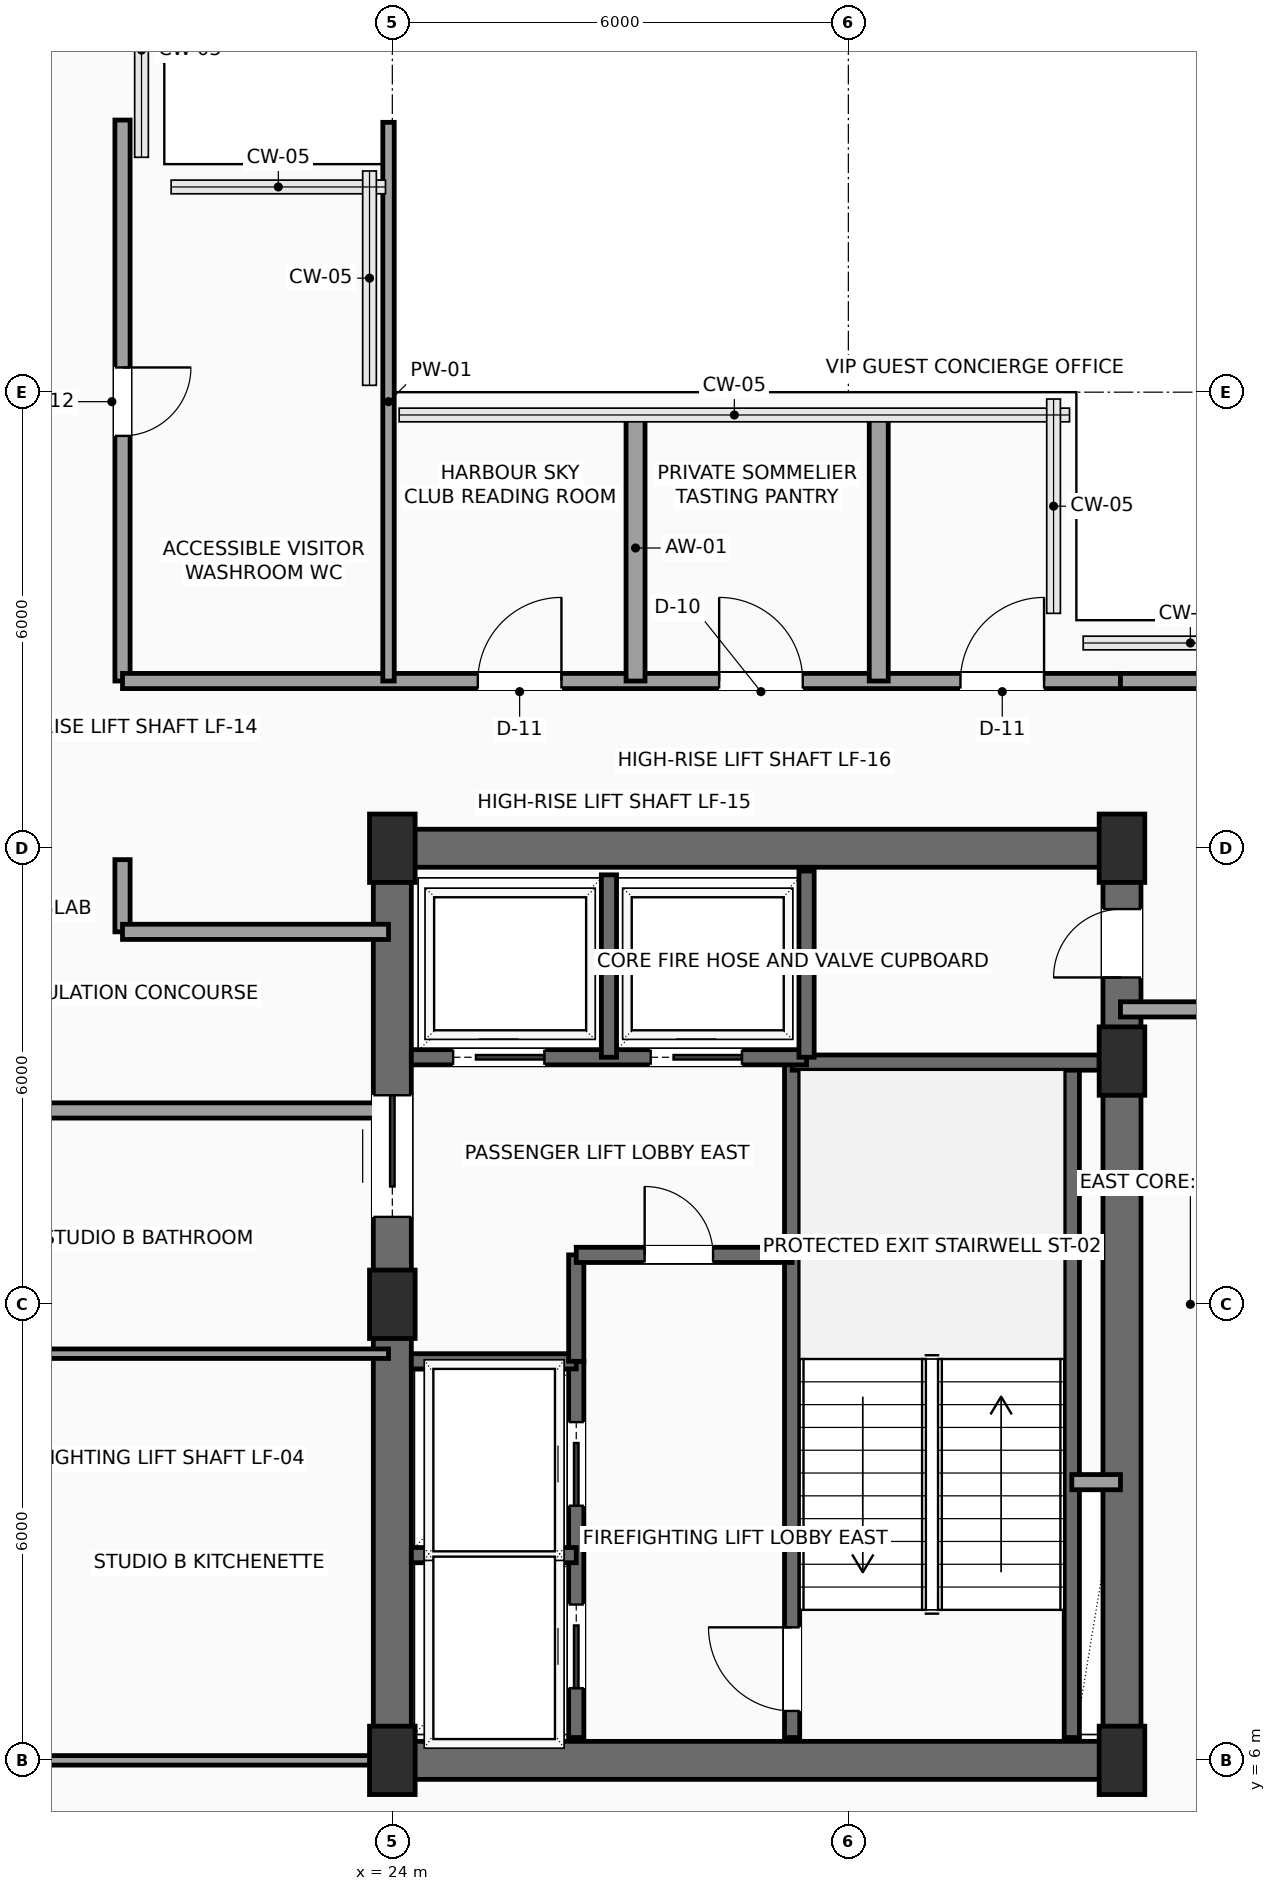
"""IFC4 building model, lengths in metres.
Left out: names, types, materials, properties, quantities, classifications, styles, units other than length and angle.
Written with IfcOpenShell. Run it as: python <this file> out.ifc"""

import sys

from ifc_helpers import new_model, si_unit, direction, frame, frame_2d, origin, origin_2d, place, context, subcontext, project, spatial, rectangle, extrude, element, fill, save


model = new_model("IFC4")
c1 = context("Model", 3, precision=1e-05, world=origin(), true_north=direction((0.0, 1.0)))
c2 = subcontext(c1, "Body", "Model", "MODEL_VIEW")
j1 = project(units=[si_unit("LENGTHUNIT", "METRE"), si_unit("PLANEANGLEUNIT", "RADIAN")], contexts=[c1])
p1 = place(None, origin())
s1 = spatial("IfcSite", under=j1, at=p1, CompositionType="ELEMENT")
p2 = place(p1, origin())
s2 = spatial("IfcBuilding", under=s1, at=p2, CompositionType="ELEMENT")
p3 = place(p2, frame((0.0, 0.0, 243.2)))
s3 = spatial("IfcBuildingStorey", under=s2, at=p3, CompositionType="ELEMENT", Elevation=243.2)
for number, where, z_axis, x_axis in (
    (1, (24.0, 6.0, 0.0), (0.0, 0.0, 1.0), (1.0, 0.0, 0.0)),
    (2, (24.0, 12.0, 0.0), (0.0, 0.0, 1.0), (1.0, 0.0, 0.0)),
    (3, (24.0, 18.0, 0.0), (0.0, 0.0, 1.0), (1.0, 0.0, 0.0)),
    (4, (33.6, 6.0, 0.0), (0.0, 0.0, 1.0), (1.0, 0.0, 0.0)),
    (5, (33.6, 15.2, 0.0), (0.0, 0.0, 1.0), (1.0, 0.0, 0.0)),
    (6, (33.6, 18.0, 0.0), (0.0, 0.0, 1.0), (1.0, 0.0, 0.0)),
):
    element("IfcColumn", number, at=place(p3, frame(where, z_axis=z_axis, x_axis=x_axis)), inside=s3, PredefinedType="COLUMN", context=c2, shape_type="SweptSolid", body=[
        extrude(rectangle(XDim=0.6, YDim=0.9, at=origin_2d()), origin(), (0.0, 0.0, 1.0), 3.5),
    ])
for number, where, z_axis, x_axis in (
    (7, (24.0, 6.0, 0.0), (0.0, 0.0, 1.0), (1.0, 0.0, 0.0)),
    (8, (24.0, 18.0, 0.0), (0.0, 0.0, 1.0), (1.0, 0.0, 0.0)),
):
    element("IfcWall", number, at=place(p3, frame(where, z_axis=z_axis, x_axis=x_axis)), inside=s3, PredefinedType="SHEAR", context=c2, shape_type="SweptSolid", body=[
        extrude(rectangle(XDim=9.6, YDim=0.5, at=frame_2d((4.8, 0.0))), origin(), (0.0, 0.0, 1.0), 3.3),
    ])
p4 = place(p3, frame((24.0, 6.0, 0.0), z_axis=(0.0, 0.0, 1.0), x_axis=(0.0, 1.0, 0.0)))
e9 = element("IfcWall", 9, at=p4, inside=s3, PredefinedType="SHEAR", context=c2, shape_type="SweptSolid", body=[
    extrude(rectangle(XDim=12.0, YDim=0.5, at=frame_2d((6.0, 0.0))), origin(), (0.0, 0.0, 1.0), 3.3),
])
p5 = place(p4, frame((7.15, 0.0, 0.0)))
e10 = element("IfcOpeningElement", 10, at=p5, cuts=e9, PredefinedType="OPENING", context=c2, shape_type="SweptSolid", body=[
    extrude(rectangle(XDim=1.6, YDim=2.3, at=frame_2d((0.8, 1.15))), frame((0.0, 0.26, 0.0), z_axis=(0.0, -1.0, 0.0), x_axis=(1.0, 0.0, 0.0)), (0.0, 0.0, 1.0), 0.52),
])
p6 = place(p3, frame((33.6, 6.0, 0.0), z_axis=(0.0, 0.0, 1.0), x_axis=(0.0, 1.0, 0.0)))
e11 = element("IfcWall", 11, at=p6, inside=s3, PredefinedType="SHEAR", context=c2, shape_type="SweptSolid", body=[
    extrude(rectangle(XDim=12.0, YDim=0.5, at=frame_2d((6.0, 0.0))), origin(), (0.0, 0.0, 1.0), 3.3),
])
p7 = place(p6, frame((10.3, 0.0, 0.0)))
e12 = element("IfcOpeningElement", 12, at=p7, cuts=e11, PredefinedType="OPENING", context=c2, shape_type="SweptSolid", body=[
    extrude(rectangle(XDim=0.9, YDim=2.15, at=frame_2d((0.45, 1.075))), frame((0.0, 0.26, 0.0), z_axis=(0.0, -1.0, 0.0), x_axis=(1.0, 0.0, 0.0)), (0.0, 0.0, 1.0), 0.52),
])
p8 = place(p3, frame((29.26, 6.3, 0.0), z_axis=(0.0, 0.0, 1.0), x_axis=(0.0, 1.0, 0.0)))
e13 = element("IfcWall", 13, at=p8, inside=s3, PredefinedType="SHEAR", context=c2, shape_type="SweptSolid", body=[
    extrude(rectangle(XDim=8.88, YDim=0.2, at=frame_2d((4.44, 0.0))), origin(), (0.0, 0.0, 1.0), 3.3),
])
p9 = place(p8, frame((0.35, 0.0, 0.0)))
e14 = element("IfcOpeningElement", 14, at=p9, cuts=e13, PredefinedType="OPENING", context=c2, shape_type="SweptSolid", body=[
    extrude(rectangle(XDim=1.1, YDim=2.2, at=frame_2d((0.55, 1.1))), frame((0.0, 0.11, 0.0), z_axis=(0.0, -1.0, 0.0), x_axis=(1.0, 0.0, 0.0)), (0.0, 0.0, 1.0), 0.22),
])
p10 = place(p3, frame((32.94, 6.3, 0.0), z_axis=(0.0, 0.0, 1.0), x_axis=(0.0, 1.0, 0.0)))
e15 = element("IfcWall", 15, at=p10, inside=s3, PredefinedType="SHEAR", context=c2, shape_type="SweptSolid", body=[
    extrude(rectangle(XDim=8.88, YDim=0.2, at=frame_2d((4.44, 0.0))), origin(), (0.0, 0.0, 1.0), 3.3),
])
p11 = place(p3, frame((29.26, 15.18, 0.0), z_axis=(0.0, 0.0, 1.0), x_axis=(1.0, 0.0, 0.0)))
e16 = element("IfcWall", 16, at=p11, inside=s3, PredefinedType="SHEAR", context=c2, shape_type="SweptSolid", body=[
    extrude(rectangle(XDim=4.04, YDim=0.2, at=frame_2d((2.02, 0.0))), origin(), (0.0, 0.0, 1.0), 3.3),
])
p12 = place(p3, frame((26.42, 6.3, 0.0), z_axis=(0.0, 0.0, 1.0), x_axis=(0.0, 1.0, 0.0)))
e17 = element("IfcWall", 17, at=p12, inside=s3, PredefinedType="SHEAR", context=c2, shape_type="SweptSolid", body=[
    extrude(rectangle(XDim=4.95, YDim=0.2, at=frame_2d((2.475, 0.0))), origin(), (0.0, 0.0, 1.0), 3.3),
])
p13 = place(p12, frame((0.65, 0.0, 0.0)))
e18 = element("IfcOpeningElement", 18, at=p13, cuts=e17, PredefinedType="OPENING", context=c2, shape_type="SweptSolid", body=[
    extrude(rectangle(XDim=1.1, YDim=2.2, at=frame_2d((0.55, 1.1))), frame((0.0, 0.11, 0.0), z_axis=(0.0, -1.0, 0.0), x_axis=(1.0, 0.0, 0.0)), (0.0, 0.0, 1.0), 0.22),
])
p14 = place(p12, frame((3.05, 0.0, 0.0)))
e19 = element("IfcOpeningElement", 19, at=p14, cuts=e17, PredefinedType="OPENING", context=c2, shape_type="SweptSolid", body=[
    extrude(rectangle(XDim=1.1, YDim=2.2, at=frame_2d((0.55, 1.1))), frame((0.0, 0.11, 0.0), z_axis=(0.0, -1.0, 0.0), x_axis=(1.0, 0.0, 0.0)), (0.0, 0.0, 1.0), 0.22),
])
for number, where, z_axis, x_axis in (
    (20, (24.25, 8.7, 0.0), (0.0, 0.0, 1.0), (1.0, 0.0, 0.0)),
    (21, (24.25, 11.25, 0.0), (0.0, 0.0, 1.0), (1.0, 0.0, 0.0)),
):
    element("IfcWall", number, at=place(p3, frame(where, z_axis=z_axis, x_axis=x_axis)), inside=s3, PredefinedType="SHEAR", context=c2, shape_type="SweptSolid", body=[
        extrude(rectangle(XDim=2.17, YDim=0.2, at=frame_2d((1.085, 0.0))), origin(), (0.0, 0.0, 1.0), 3.3),
    ])
p15 = place(p3, frame((26.42, 11.25, 0.0), z_axis=(0.0, 0.0, 1.0), x_axis=(0.0, 1.0, 0.0)))
e22 = element("IfcWall", 22, at=p15, inside=s3, PredefinedType="SHEAR", context=c2, shape_type="SweptSolid", body=[
    extrude(rectangle(XDim=1.4, YDim=0.2, at=frame_2d((0.7, 0.0))), origin(), (0.0, 0.0, 1.0), 3.3),
])
p16 = place(p3, frame((26.42, 12.65, 0.0), z_axis=(0.0, 0.0, 1.0), x_axis=(1.0, 0.0, 0.0)))
e23 = element("IfcWall", 23, at=p16, inside=s3, PredefinedType="SHEAR", context=c2, shape_type="SweptSolid", body=[
    extrude(rectangle(XDim=2.84, YDim=0.2, at=frame_2d((1.42, 0.0))), origin(), (0.0, 0.0, 1.0), 3.3),
])
p17 = place(p16, frame((0.9, 0.0, 0.0)))
e24 = element("IfcOpeningElement", 24, at=p17, cuts=e23, PredefinedType="OPENING", context=c2, shape_type="SweptSolid", body=[
    extrude(rectangle(XDim=0.9, YDim=2.15, at=frame_2d((0.45, 1.075))), frame((0.0, 0.11, 0.0), z_axis=(0.0, -1.0, 0.0), x_axis=(1.0, 0.0, 0.0)), (0.0, 0.0, 1.0), 0.22),
])
p18 = place(p3, frame((32.94, 9.66, 0.0), z_axis=(0.0, 0.0, 1.0), x_axis=(1.0, 0.0, 0.0)))
e25 = element("IfcWall", 25, at=p18, inside=s3, PredefinedType="SOLIDWALL", context=c2, shape_type="SweptSolid", body=[
    extrude(rectangle(XDim=0.64, YDim=0.2, at=frame_2d((0.32, 0.0))), origin(), (0.0, 0.0, 1.0), 3.3),
])
p19 = place(p3, frame((24.25, 15.25, 0.0), z_axis=(0.0, 0.0, 1.0), x_axis=(1.0, 0.0, 0.0)))
e26 = element("IfcWall", 26, at=p19, inside=s3, PredefinedType="SHEAR", context=c2, shape_type="SweptSolid", body=[
    extrude(rectangle(XDim=5.2, YDim=0.2, at=frame_2d((2.6, 0.0))), origin(), (0.0, 0.0, 1.0), 3.3),
])
p20 = place(p19, frame((0.55, 0.0, 0.0)))
e27 = element("IfcOpeningElement", 27, at=p20, cuts=e26, PredefinedType="OPENING", context=c2, shape_type="SweptSolid", body=[
    extrude(rectangle(XDim=1.2, YDim=2.2, at=frame_2d((0.6, 1.1))), frame((0.0, 0.11, 0.0), z_axis=(0.0, -1.0, 0.0), x_axis=(1.0, 0.0, 0.0)), (0.0, 0.0, 1.0), 0.22),
])
p21 = place(p19, frame((3.15, 0.0, 0.0)))
e28 = element("IfcOpeningElement", 28, at=p21, cuts=e26, PredefinedType="OPENING", context=c2, shape_type="SweptSolid", body=[
    extrude(rectangle(XDim=1.2, YDim=2.2, at=frame_2d((0.6, 1.1))), frame((0.0, 0.11, 0.0), z_axis=(0.0, -1.0, 0.0), x_axis=(1.0, 0.0, 0.0)), (0.0, 0.0, 1.0), 0.22),
])
p22 = place(p3, frame((26.85, 15.25, 0.0), z_axis=(0.0, 0.0, 1.0), x_axis=(0.0, 1.0, 0.0)))
e29 = element("IfcWall", 29, at=p22, inside=s3, PredefinedType="SHEAR", context=c2, shape_type="SweptSolid", body=[
    extrude(rectangle(XDim=2.4, YDim=0.2, at=frame_2d((1.2, 0.0))), origin(), (0.0, 0.0, 1.0), 3.3),
])
p23 = place(p3, frame((29.45, 15.25, 0.0), z_axis=(0.0, 0.0, 1.0), x_axis=(0.0, 1.0, 0.0)))
e30 = element("IfcWall", 30, at=p23, inside=s3, PredefinedType="SHEAR", context=c2, shape_type="SweptSolid", body=[
    extrude(rectangle(XDim=2.45, YDim=0.2, at=frame_2d((1.225, 0.0))), origin(), (0.0, 0.0, 1.0), 3.3),
])
p24 = place(p3, frame((20.45, 27.58, 0.0), z_axis=(0.0, 0.0, 1.0), x_axis=(0.0, -1.0, 0.0)))
e31 = element("IfcWall", 31, at=p24, inside=s3, PredefinedType="PARTITIONING", context=c2, shape_type="SweptSolid", body=[
    extrude(rectangle(XDim=7.38, YDim=0.2, at=frame_2d((3.69, 0.0))), origin(), (0.0, 0.0, 1.0), 3.3),
])
p25 = place(p24, frame((3.255, 0.0, 0.0)))
e32 = element("IfcOpeningElement", 32, at=p25, cuts=e31, PredefinedType="OPENING", context=c2, shape_type="SweptSolid", body=[
    extrude(rectangle(XDim=0.9, YDim=2.1, at=frame_2d((0.45, 1.05))), frame((0.0, 0.11, 0.0), z_axis=(0.0, -1.0, 0.0), x_axis=(1.0, 0.0, 0.0)), (0.0, 0.0, 1.0), 0.22),
])
p26 = place(p3, frame((20.45, 20.2, 0.0), z_axis=(0.0, 0.0, 1.0), x_axis=(1.0, 0.0, 0.0)))
e33 = element("IfcWall", 33, at=p26, inside=s3, PredefinedType="PARTITIONING", context=c2, shape_type="SweptSolid", body=[
    extrude(rectangle(XDim=13.13, YDim=0.2, at=frame_2d((6.565, 0.0))), origin(), (0.0, 0.0, 1.0), 3.3),
])
p27 = place(p26, frame((4.675, 0.0, 0.0)))
e34 = element("IfcOpeningElement", 34, at=p27, cuts=e33, PredefinedType="OPENING", context=c2, shape_type="SweptSolid", body=[
    extrude(rectangle(XDim=1.1, YDim=2.25, at=frame_2d((0.55, 1.125))), frame((0.0, 0.11, 0.0), z_axis=(0.0, -1.0, 0.0), x_axis=(1.0, 0.0, 0.0)), (0.0, 0.0, 1.0), 0.22),
])
p28 = place(p26, frame((7.85, 0.0, 0.0)))
e35 = element("IfcOpeningElement", 35, at=p28, cuts=e33, PredefinedType="OPENING", context=c2, shape_type="SweptSolid", body=[
    extrude(rectangle(XDim=1.1, YDim=2.25, at=frame_2d((0.55, 1.125))), frame((0.0, 0.11, 0.0), z_axis=(0.0, -1.0, 0.0), x_axis=(1.0, 0.0, 0.0)), (0.0, 0.0, 1.0), 0.22),
])
p29 = place(p26, frame((11.025, 0.0, 0.0)))
e36 = element("IfcOpeningElement", 36, at=p29, cuts=e33, PredefinedType="OPENING", context=c2, shape_type="SweptSolid", body=[
    extrude(rectangle(XDim=1.1, YDim=2.25, at=frame_2d((0.55, 1.125))), frame((0.0, 0.11, 0.0), z_axis=(0.0, -1.0, 0.0), x_axis=(1.0, 0.0, 0.0)), (0.0, 0.0, 1.0), 0.22),
])
for number, where, z_axis, x_axis in (
    (37, (33.58, 20.2, 0.0), (0.0, 0.0, 1.0), (1.0, 0.0, 0.0)),
    (38, (35.7, 15.88, 0.0), (0.0, 0.0, 1.0), (-1.0, 0.0, 0.0)),
):
    element("IfcWall", number, at=place(p3, frame(where, z_axis=z_axis, x_axis=x_axis)), inside=s3, PredefinedType="PARTITIONING", context=c2, shape_type="SweptSolid", body=[
        extrude(rectangle(XDim=2.12, YDim=0.2, at=frame_2d((1.06, 0.0))), origin(), (0.0, 0.0, 1.0), 3.3),
    ])
p30 = place(p3, frame((20.45, 17.85, 0.0), z_axis=(0.0, 0.0, 1.0), x_axis=(0.0, -1.0, 0.0)))
e39 = element("IfcWall", 39, at=p30, inside=s3, PredefinedType="PARTITIONING", context=c2, shape_type="SweptSolid", body=[
    extrude(rectangle(XDim=0.95, YDim=0.2, at=frame_2d((0.475, 0.0))), origin(), (0.0, 0.0, 1.0), 3.3),
])
p31 = place(p3, frame((20.45, 16.9, 0.0), z_axis=(0.0, 0.0, 1.0), x_axis=(1.0, 0.0, 0.0)))
e40 = element("IfcWall", 40, at=p31, inside=s3, PredefinedType="PARTITIONING", context=c2, shape_type="SweptSolid", body=[
    extrude(rectangle(XDim=3.5, YDim=0.2, at=frame_2d((1.75, 0.0))), origin(), (0.0, 0.0, 1.0), 3.3),
])
p32 = place(p3, frame((23.95, 14.55, 0.0), z_axis=(0.0, 0.0, 1.0), x_axis=(-1.0, 0.0, 0.0)))
e41 = element("IfcWall", 41, at=p32, inside=s3, PredefinedType="PARTITIONING", context=c2, shape_type="SweptSolid", body=[
    extrude(rectangle(XDim=9.0, YDim=0.2, at=frame_2d((4.5, 0.0))), origin(), (0.0, 0.0, 1.0), 3.3),
])
p33 = place(p32, frame((6.925, 0.0, 0.0)))
e42 = element("IfcOpeningElement", 42, at=p33, cuts=e41, PredefinedType="OPENING", context=c2, shape_type="SweptSolid", body=[
    extrude(rectangle(XDim=1.0, YDim=2.2, at=frame_2d((0.5, 1.1))), frame((0.0, 0.11, 0.0), z_axis=(0.0, -1.0, 0.0), x_axis=(1.0, 0.0, 0.0)), (0.0, 0.0, 1.0), 0.22),
])
p34 = place(p3, frame((23.95, 20.2, 0.0), z_axis=(0.0, 0.0, 1.0), x_axis=(0.0, 1.0, 0.0)))
e43 = element("IfcWall", 43, at=p34, inside=s3, PredefinedType="PARTITIONING", context=c2, shape_type="SweptSolid", body=[
    extrude(rectangle(XDim=7.35, YDim=0.15, at=frame_2d((3.675, 0.0))), origin(), (0.0, 0.0, 1.0), 3.3),
])
for number, where, z_axis, x_axis in (
    (44, (27.2, 20.2, 0.0), (0.0, 0.0, 1.0), (0.0, 1.0, 0.0)),
    (45, (30.4, 20.2, 0.0), (0.0, 0.0, 1.0), (0.0, 1.0, 0.0)),
):
    element("IfcWall", number, at=place(p3, frame(where, z_axis=z_axis, x_axis=x_axis)), inside=s3, PredefinedType="PARTITIONING", context=c2, shape_type="SweptSolid", body=[
        extrude(rectangle(XDim=3.5, YDim=0.25, at=frame_2d((1.75, 0.0))), origin(), (0.0, 0.0, 1.0), 3.3),
    ])
p35 = place(p3, frame((18.0, 6.0, 0.0), z_axis=(0.0, 0.0, 1.0), x_axis=(1.0, 0.0, 0.0)))
e46 = element("IfcWall", 46, at=p35, inside=s3, PredefinedType="PARTITIONING", context=c2, shape_type="SweptSolid", body=[
    extrude(rectangle(XDim=5.95, YDim=0.125, at=frame_2d((2.975, 0.0))), origin(), (0.0, 0.0, 1.0), 2.992),
])
p36 = place(p3, frame((18.0, 11.35, 0.0), z_axis=(0.0, 0.0, 1.0), x_axis=(1.0, 0.0, 0.0)))
e47 = element("IfcWall", 47, at=p36, inside=s3, PredefinedType="PARTITIONING", context=c2, shape_type="SweptSolid", body=[
    extrude(rectangle(XDim=5.95, YDim=0.125, at=frame_2d((2.975, 0.0))), origin(), (0.0, 0.0, 1.0), 3.3),
])
p37 = place(p5, origin())
e48 = element("IfcDoor", 48, at=p37, inside=s3, OperationType="DOUBLE_DOOR_SLIDING", PredefinedType="DOOR", context=c2, shape_type="SweptSolid", body=[
    extrude(rectangle(XDim=1.6, YDim=2.3, at=frame_2d((0.8, 1.15))), frame((0.0, 0.025, 0.0), z_axis=(0.0, -1.0, 0.0), x_axis=(1.0, 0.0, 0.0)), (0.0, 0.0, 1.0), 0.05),
])
fill(e10, e48)
p38 = place(p7, origin())
e49 = element("IfcDoor", 49, at=p38, inside=s3, OperationType="SINGLE_SWING_LEFT", PredefinedType="DOOR", context=c2, shape_type="SweptSolid", body=[
    extrude(rectangle(XDim=0.9, YDim=2.15, at=frame_2d((0.45, 1.075))), frame((0.0, 0.025, 0.0), z_axis=(0.0, -1.0, 0.0), x_axis=(1.0, 0.0, 0.0)), (0.0, 0.0, 1.0), 0.05),
])
fill(e12, e49)
p39 = place(p9, origin())
e50 = element("IfcDoor", 50, at=p39, inside=s3, OperationType="SINGLE_SWING_RIGHT", PredefinedType="DOOR", context=c2, shape_type="SweptSolid", body=[
    extrude(rectangle(XDim=1.1, YDim=2.2, at=frame_2d((0.55, 1.1))), frame((0.0, 0.025, 0.0), z_axis=(0.0, -1.0, 0.0), x_axis=(1.0, 0.0, 0.0)), (0.0, 0.0, 1.0), 0.05),
])
fill(e14, e50)
p40 = place(p13, origin())
e51 = element("IfcDoor", 51, at=p40, inside=s3, OperationType="SLIDING_TO_LEFT", PredefinedType="DOOR", context=c2, shape_type="SweptSolid", body=[
    extrude(rectangle(XDim=1.1, YDim=2.2, at=frame_2d((0.55, 1.1))), frame((0.0, 0.025, 0.0), z_axis=(0.0, -1.0, 0.0), x_axis=(1.0, 0.0, 0.0)), (0.0, 0.0, 1.0), 0.05),
])
fill(e18, e51)
p41 = place(p14, origin())
e52 = element("IfcDoor", 52, at=p41, inside=s3, OperationType="SLIDING_TO_LEFT", PredefinedType="DOOR", context=c2, shape_type="SweptSolid", body=[
    extrude(rectangle(XDim=1.1, YDim=2.2, at=frame_2d((0.55, 1.1))), frame((0.0, 0.025, 0.0), z_axis=(0.0, -1.0, 0.0), x_axis=(1.0, 0.0, 0.0)), (0.0, 0.0, 1.0), 0.05),
])
fill(e19, e52)
p42 = place(p17, origin())
e53 = element("IfcDoor", 53, at=p42, inside=s3, OperationType="SINGLE_SWING_LEFT", PredefinedType="DOOR", context=c2, shape_type="SweptSolid", body=[
    extrude(rectangle(XDim=0.9, YDim=2.15, at=frame_2d((0.45, 1.075))), frame((0.0, 0.025, 0.0), z_axis=(0.0, -1.0, 0.0), x_axis=(1.0, 0.0, 0.0)), (0.0, 0.0, 1.0), 0.05),
])
fill(e24, e53)
p43 = place(p20, origin())
e54 = element("IfcDoor", 54, at=p43, inside=s3, OperationType="SLIDING_TO_RIGHT", PredefinedType="DOOR", context=c2, shape_type="SweptSolid", body=[
    extrude(rectangle(XDim=1.2, YDim=2.2, at=frame_2d((0.6, 1.1))), frame((0.0, 0.025, 0.0), z_axis=(0.0, -1.0, 0.0), x_axis=(1.0, 0.0, 0.0)), (0.0, 0.0, 1.0), 0.05),
])
fill(e27, e54)
p44 = place(p21, origin())
e55 = element("IfcDoor", 55, at=p44, inside=s3, OperationType="SLIDING_TO_RIGHT", PredefinedType="DOOR", context=c2, shape_type="SweptSolid", body=[
    extrude(rectangle(XDim=1.2, YDim=2.2, at=frame_2d((0.6, 1.1))), frame((0.0, 0.025, 0.0), z_axis=(0.0, -1.0, 0.0), x_axis=(1.0, 0.0, 0.0)), (0.0, 0.0, 1.0), 0.05),
])
fill(e28, e55)
p45 = place(p25, origin())
e56 = element("IfcDoor", 56, at=p45, inside=s3, OperationType="SINGLE_SWING_LEFT", PredefinedType="DOOR", context=c2, shape_type="SweptSolid", body=[
    extrude(rectangle(XDim=0.9, YDim=2.1, at=frame_2d((0.45, 1.05))), frame((0.0, 0.025, 0.0), z_axis=(0.0, -1.0, 0.0), x_axis=(1.0, 0.0, 0.0)), (0.0, 0.0, 1.0), 0.05),
])
fill(e32, e56)
p46 = place(p27, origin())
e57 = element("IfcDoor", 57, at=p46, inside=s3, OperationType="SINGLE_SWING_RIGHT", PredefinedType="DOOR", context=c2, shape_type="SweptSolid", body=[
    extrude(rectangle(XDim=1.1, YDim=2.25, at=frame_2d((0.55, 1.125))), frame((0.0, 0.025, 0.0), z_axis=(0.0, -1.0, 0.0), x_axis=(1.0, 0.0, 0.0)), (0.0, 0.0, 1.0), 0.05),
])
fill(e34, e57)
p47 = place(p28, origin())
e58 = element("IfcDoor", 58, at=p47, inside=s3, OperationType="SINGLE_SWING_LEFT", PredefinedType="DOOR", context=c2, shape_type="SweptSolid", body=[
    extrude(rectangle(XDim=1.1, YDim=2.25, at=frame_2d((0.55, 1.125))), frame((0.0, 0.025, 0.0), z_axis=(0.0, -1.0, 0.0), x_axis=(1.0, 0.0, 0.0)), (0.0, 0.0, 1.0), 0.05),
])
fill(e35, e58)
p48 = place(p29, origin())
e59 = element("IfcDoor", 59, at=p48, inside=s3, OperationType="SINGLE_SWING_RIGHT", PredefinedType="DOOR", context=c2, shape_type="SweptSolid", body=[
    extrude(rectangle(XDim=1.1, YDim=2.25, at=frame_2d((0.55, 1.125))), frame((0.0, 0.025, 0.0), z_axis=(0.0, -1.0, 0.0), x_axis=(1.0, 0.0, 0.0)), (0.0, 0.0, 1.0), 0.05),
])
fill(e36, e59)
save(model, sys.argv[1])
